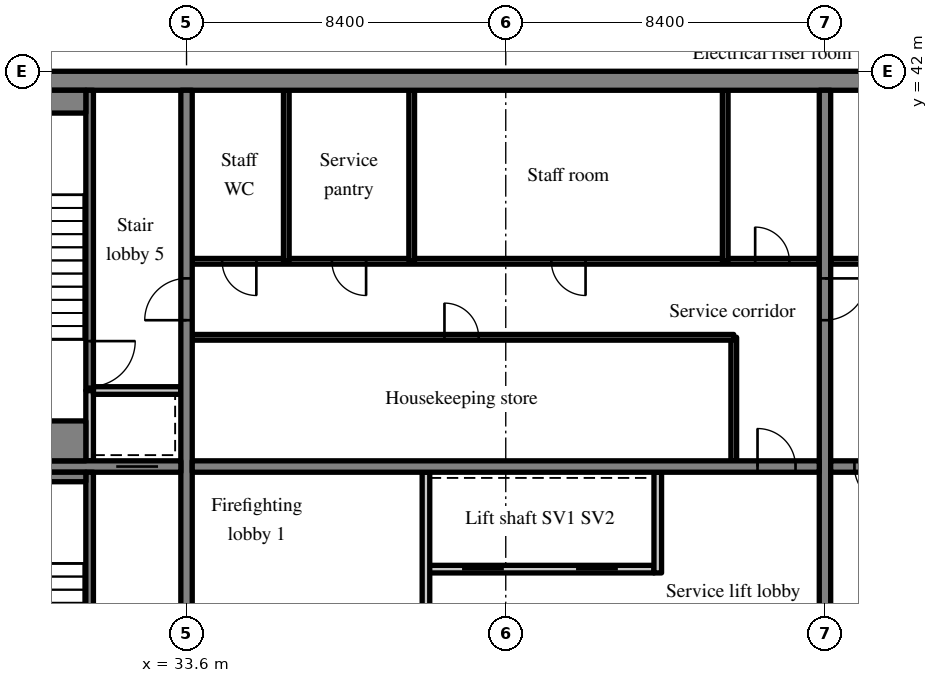
"""IFC4 building model, lengths in metres.
Left out: names, types, materials, properties, quantities, classifications, styles, units other than length and angle.
Written with IfcOpenShell. Run it as: python <this file> out.ifc"""

import sys

from ifc_helpers import new_model, si_unit, direction, frame, frame_2d, origin, place, context, subcontext, project, spatial, rectangle, extrude, source, transform, mapped, element, fill, save


model = new_model("IFC4")
c1 = context("Model", 3, precision=1e-05, world=origin(), true_north=direction((0.0, 1.0)))
c2 = subcontext(c1, "Body", "Model", "MODEL_VIEW")
j1 = project(units=[si_unit("LENGTHUNIT", "METRE"), si_unit("PLANEANGLEUNIT", "RADIAN")], contexts=[c1])
p1 = place(None, origin())
s1 = spatial("IfcSite", under=j1, at=p1, CompositionType="ELEMENT")
p2 = place(p1, origin())
s2 = spatial("IfcBuilding", under=s1, at=p2, CompositionType="ELEMENT")
p3 = place(p2, frame((0.0, 0.0, 281.7)))
s3 = spatial("IfcBuildingStorey", under=s2, at=p3, CompositionType="ELEMENT", Elevation=281.7)
m1 = source(origin(), c2, "Body", "SweptSolid", [
    extrude(rectangle(XDim=50.4, YDim=0.5, at=frame_2d((25.2, 0.0))), origin(), (0.0, 0.0, 1.0), 3.72),
])
p4 = place(p3, frame((25.2, 41.75, 0.0), z_axis=(0.0, 0.0, 1.0), x_axis=(1.0, 0.0, 0.0)))
e1 = element("IfcWall", 1, at=p4, inside=s3, PredefinedType="SHEAR", context=c2, shape_type="MappedRepresentation", body=[
    mapped(m1, transform((0.0, 0.0, 0.0), scale=1.0)),
])
m2 = source(origin(), c2, "Body", "SweptSolid", [
    extrude(rectangle(XDim=19.0, YDim=0.3, at=frame_2d((9.5, 0.0))), origin(), (0.0, 0.0, 1.0), 3.72),
])
p5 = place(p3, frame((33.6, 22.5, 0.0), z_axis=(0.0, 0.0, 1.0), x_axis=(0.0, 1.0, 0.0)))
e2 = element("IfcWall", 2, at=p5, inside=s3, PredefinedType="SHEAR", context=c2, shape_type="MappedRepresentation", body=[
    mapped(m2, transform((0.0, 0.0, 0.0), scale=1.0)),
])
m3 = source(origin(), c2, "Body", "SweptSolid", [
    extrude(rectangle(XDim=1.1, YDim=2.1, at=frame_2d((0.55, 1.05))), frame((0.0, 0.16, 0.0), z_axis=(0.0, -1.0, 0.0), x_axis=(1.0, 0.0, 0.0)), (0.0, 0.0, 1.0), 0.32),
])
p6 = place(p5, frame((12.95, 0.0, 0.0)))
e3 = element("IfcOpeningElement", 3, at=p6, cuts=e2, PredefinedType="OPENING", context=c2, shape_type="MappedRepresentation", body=[
    mapped(m3, transform((0.0, 0.0, 0.0), scale=1.0)),
])
p7 = place(p3, frame((50.4, 22.5, 0.0), z_axis=(0.0, 0.0, 1.0), x_axis=(0.0, 1.0, 0.0)))
e4 = element("IfcWall", 4, at=p7, inside=s3, PredefinedType="SHEAR", context=c2, shape_type="MappedRepresentation", body=[
    mapped(m2, transform((0.0, 0.0, 0.0), scale=1.0)),
])
p8 = place(p7, frame((12.95, 0.0, 0.0)))
e5 = element("IfcOpeningElement", 5, at=p8, cuts=e4, PredefinedType="OPENING", context=c2, shape_type="MappedRepresentation", body=[
    mapped(m3, transform((0.0, 0.0, 0.0), scale=1.0)),
])
m4 = source(origin(), c2, "Body", "SweptSolid", [
    extrude(rectangle(XDim=7.75, YDim=0.3, at=frame_2d((3.875, 0.0))), origin(), (0.0, 0.0, 1.0), 3.72),
])
p9 = place(p3, frame((25.7, 31.6, 0.0), z_axis=(0.0, 0.0, 1.0), x_axis=(1.0, 0.0, 0.0)))
e6 = element("IfcWall", 6, at=p9, inside=s3, PredefinedType="SHEAR", context=c2, shape_type="MappedRepresentation", body=[
    mapped(m4, transform((0.0, 0.0, 0.0), scale=1.0)),
])
p10 = place(p9, frame((6.05, 0.0, 0.0)))
e7 = element("IfcOpeningElement", 7, at=p10, cuts=e6, PredefinedType="OPENING", context=c2, shape_type="MappedRepresentation", body=[
    mapped(m3, transform((0.0, 0.0, 0.0), scale=1.0)),
])
m5 = source(origin(), c2, "Body", "SweptSolid", [
    extrude(rectangle(XDim=16.5, YDim=0.3, at=frame_2d((8.25, 0.0))), origin(), (0.0, 0.0, 1.0), 3.72),
])
p11 = place(p3, frame((33.75, 31.6, 0.0), z_axis=(0.0, 0.0, 1.0), x_axis=(1.0, 0.0, 0.0)))
e8 = element("IfcWall", 8, at=p11, inside=s3, PredefinedType="SHEAR", context=c2, shape_type="MappedRepresentation", body=[
    mapped(m5, transform((0.0, 0.0, 0.0), scale=1.0)),
])
m6 = source(origin(), c2, "Body", "SweptSolid", [
    extrude(rectangle(XDim=1.0, YDim=2.1, at=frame_2d((0.5, 1.05))), frame((0.0, 0.16, 0.0), z_axis=(0.0, -1.0, 0.0), x_axis=(1.0, 0.0, 0.0)), (0.0, 0.0, 1.0), 0.32),
])
p12 = place(p11, frame((14.875, 0.0, 0.0)))
e9 = element("IfcOpeningElement", 9, at=p12, cuts=e8, PredefinedType="OPENING", context=c2, shape_type="MappedRepresentation", body=[
    mapped(m6, transform((0.0, 0.0, 0.0), scale=1.0)),
])
p13 = place(p3, frame((50.55, 31.6, 0.0), z_axis=(0.0, 0.0, 1.0), x_axis=(1.0, 0.0, 0.0)))
e10 = element("IfcWall", 10, at=p13, inside=s3, PredefinedType="SHEAR", context=c2, shape_type="MappedRepresentation", body=[
    mapped(m5, transform((0.0, 0.0, 0.0), scale=1.0)),
])
p14 = place(p13, frame((0.625, 0.0, 0.0)))
e11 = element("IfcOpeningElement", 11, at=p14, cuts=e10, PredefinedType="OPENING", context=c2, shape_type="MappedRepresentation", body=[
    mapped(m6, transform((0.0, 0.0, 0.0), scale=1.0)),
])
m7 = source(origin(), c2, "Body", "SweptSolid", [
    extrude(rectangle(XDim=6.0, YDim=0.2, at=frame_2d((3.0, 0.0))), origin(), (0.0, 0.0, 1.0), 3.72),
])
p15 = place(p3, frame((39.9, 28.9, 0.0), z_axis=(0.0, 0.0, 1.0), x_axis=(1.0, 0.0, 0.0)))
e12 = element("IfcWall", 12, at=p15, inside=s3, PredefinedType="SOLIDWALL", context=c2, shape_type="MappedRepresentation", body=[
    mapped(m7, transform((0.0, 0.0, 0.0), scale=1.0)),
])
m8 = source(origin(), c2, "Body", "SweptSolid", [
    extrude(rectangle(XDim=1.1, YDim=2.1, at=frame_2d((0.55, 1.05))), frame((0.0, 0.11, 0.0), z_axis=(0.0, -1.0, 0.0), x_axis=(1.0, 0.0, 0.0)), (0.0, 0.0, 1.0), 0.22),
])
p16 = place(p15, frame((0.95, 0.0, 0.0)))
e13 = element("IfcOpeningElement", 13, at=p16, cuts=e12, PredefinedType="OPENING", context=c2, shape_type="MappedRepresentation", body=[
    mapped(m8, transform((0.0, 0.0, 0.0), scale=1.0)),
])
p17 = place(p15, frame((3.95, 0.0, 0.0)))
e14 = element("IfcOpeningElement", 14, at=p17, cuts=e12, PredefinedType="OPENING", context=c2, shape_type="MappedRepresentation", body=[
    mapped(m8, transform((0.0, 0.0, 0.0), scale=1.0)),
])
m9 = source(origin(), c2, "Body", "SweptSolid", [
    extrude(rectangle(XDim=8.95, YDim=0.2, at=frame_2d((4.475, 0.0))), origin(), (0.0, 0.0, 1.0), 3.72),
])
p18 = place(p3, frame((39.9, 22.5, 0.0), z_axis=(0.0, 0.0, 1.0), x_axis=(0.0, 1.0, 0.0)))
e15 = element("IfcWall", 15, at=p18, inside=s3, PredefinedType="PARTITIONING", context=c2, shape_type="MappedRepresentation", body=[
    mapped(m9, transform((0.0, 0.0, 0.0), scale=1.0)),
])
m10 = source(origin(), c2, "Body", "SweptSolid", [
    extrude(rectangle(XDim=0.9, YDim=2.1, at=frame_2d((0.45, 1.05))), frame((0.0, 0.11, 0.0), z_axis=(0.0, -1.0, 0.0), x_axis=(1.0, 0.0, 0.0)), (0.0, 0.0, 1.0), 0.22),
])
p19 = place(p18, frame((4.05, 0.0, 0.0)))
e16 = element("IfcOpeningElement", 16, at=p19, cuts=e15, PredefinedType="OPENING", context=c2, shape_type="MappedRepresentation", body=[
    mapped(m10, transform((0.0, 0.0, 0.0), scale=1.0)),
])
m11 = source(origin(), c2, "Body", "SweptSolid", [
    extrude(rectangle(XDim=2.65, YDim=0.2, at=frame_2d((1.325, 0.0))), origin(), (0.0, 0.0, 1.0), 3.72),
])
p20 = place(p3, frame((46.0, 28.8, 0.0), z_axis=(0.0, 0.0, 1.0), x_axis=(0.0, 1.0, 0.0)))
e17 = element("IfcWall", 17, at=p20, inside=s3, PredefinedType="SOLIDWALL", context=c2, shape_type="MappedRepresentation", body=[
    mapped(m11, transform((0.0, 0.0, 0.0), scale=1.0)),
])
m12 = source(origin(), c2, "Body", "SweptSolid", [
    extrude(rectangle(XDim=3.25, YDim=0.15, at=frame_2d((1.625, 0.0))), origin(), (0.0, 0.0, 1.0), 3.72),
])
p21 = place(p3, frame((48.0, 31.75, 0.0), z_axis=(0.0, 0.0, 1.0), x_axis=(0.0, 1.0, 0.0)))
e18 = element("IfcWall", 18, at=p21, inside=s3, PredefinedType="PARTITIONING", context=c2, shape_type="MappedRepresentation", body=[
    mapped(m12, transform((0.0, 0.0, 0.0), scale=1.0)),
])
m13 = source(origin(), c2, "Body", "SweptSolid", [
    extrude(rectangle(XDim=14.25, YDim=0.15, at=frame_2d((7.125, 0.0))), origin(), (0.0, 0.0, 1.0), 3.72),
])
p22 = place(p3, frame((33.75, 35.0, 0.0), z_axis=(0.0, 0.0, 1.0), x_axis=(1.0, 0.0, 0.0)))
e19 = element("IfcWall", 19, at=p22, inside=s3, PredefinedType="PARTITIONING", context=c2, shape_type="MappedRepresentation", body=[
    mapped(m13, transform((0.0, 0.0, 0.0), scale=1.0)),
])
m14 = source(origin(), c2, "Body", "SweptSolid", [
    extrude(rectangle(XDim=0.9, YDim=2.1, at=frame_2d((0.45, 1.05))), frame((0.0, 0.085, 0.0), z_axis=(0.0, -1.0, 0.0), x_axis=(1.0, 0.0, 0.0)), (0.0, 0.0, 1.0), 0.17),
])
p23 = place(p22, frame((6.637, 0.0, 0.0)))
e20 = element("IfcOpeningElement", 20, at=p23, cuts=e19, PredefinedType="OPENING", context=c2, shape_type="MappedRepresentation", body=[
    mapped(m14, transform((0.0, 0.0, 0.0), scale=1.0)),
])
m15 = source(origin(), c2, "Body", "SweptSolid", [
    extrude(rectangle(XDim=16.5, YDim=0.15, at=frame_2d((8.25, 0.0))), origin(), (0.0, 0.0, 1.0), 3.72),
])
p24 = place(p3, frame((33.75, 37.0, 0.0), z_axis=(0.0, 0.0, 1.0), x_axis=(1.0, 0.0, 0.0)))
e21 = element("IfcWall", 21, at=p24, inside=s3, PredefinedType="PARTITIONING", context=c2, shape_type="MappedRepresentation", body=[
    mapped(m15, transform((0.0, 0.0, 0.0), scale=1.0)),
])
p25 = place(p24, frame((0.787, 0.0, 0.0)))
e22 = element("IfcOpeningElement", 22, at=p25, cuts=e21, PredefinedType="OPENING", context=c2, shape_type="MappedRepresentation", body=[
    mapped(m14, transform((0.0, 0.0, 0.0), scale=1.0)),
])
p26 = place(p24, frame((3.675, 0.0, 0.0)))
e23 = element("IfcOpeningElement", 23, at=p26, cuts=e21, PredefinedType="OPENING", context=c2, shape_type="MappedRepresentation", body=[
    mapped(m14, transform((0.0, 0.0, 0.0), scale=1.0)),
])
p27 = place(p24, frame((9.45, 0.0, 0.0)))
e24 = element("IfcOpeningElement", 24, at=p27, cuts=e21, PredefinedType="OPENING", context=c2, shape_type="MappedRepresentation", body=[
    mapped(m14, transform((0.0, 0.0, 0.0), scale=1.0)),
])
p28 = place(p24, frame((14.813, 0.0, 0.0)))
e25 = element("IfcOpeningElement", 25, at=p28, cuts=e21, PredefinedType="OPENING", context=c2, shape_type="MappedRepresentation", body=[
    mapped(m14, transform((0.0, 0.0, 0.0), scale=1.0)),
])
m16 = source(origin(), c2, "Body", "SweptSolid", [
    extrude(rectangle(XDim=4.5, YDim=0.15, at=frame_2d((2.25, 0.0))), origin(), (0.0, 0.0, 1.0), 3.72),
])
for number, where, z_axis, x_axis in (
    (26, (36.225, 37.0, 0.0), (0.0, 0.0, 1.0), (0.0, 1.0, 0.0)),
    (27, (39.525, 37.0, 0.0), (0.0, 0.0, 1.0), (0.0, 1.0, 0.0)),
    (28, (47.775, 37.0, 0.0), (0.0, 0.0, 1.0), (0.0, 1.0, 0.0)),
):
    element("IfcWall", number, at=place(p3, frame(where, z_axis=z_axis, x_axis=x_axis)), inside=s3, PredefinedType="PARTITIONING", context=c2, shape_type="MappedRepresentation", body=[
        mapped(m16, transform((0.0, 0.0, 0.0), scale=1.0)),
    ])
p29 = place(p3, frame((67.05, 37.0, 0.0), z_axis=(0.0, 0.0, 1.0), x_axis=(-1.0, 0.0, 0.0)))
e29 = element("IfcWall", 29, at=p29, inside=s3, PredefinedType="PARTITIONING", context=c2, shape_type="MappedRepresentation", body=[
    mapped(m15, transform((0.0, 0.0, 0.0), scale=1.0)),
])
p30 = place(p29, frame((6.563, 0.0, 0.0)))
e30 = element("IfcOpeningElement", 30, at=p30, cuts=e29, PredefinedType="OPENING", context=c2, shape_type="MappedRepresentation", body=[
    mapped(m14, transform((0.0, 0.0, 0.0), scale=1.0)),
])
p31 = place(p29, frame((14.813, 0.0, 0.0)))
e31 = element("IfcOpeningElement", 31, at=p31, cuts=e29, PredefinedType="OPENING", context=c2, shape_type="MappedRepresentation", body=[
    mapped(m14, transform((0.0, 0.0, 0.0), scale=1.0)),
])
m17 = source(origin(), c2, "Body", "SweptSolid", [
    extrude(rectangle(XDim=8.95, YDim=0.2, at=frame_2d((4.475, 0.0))), origin(), (0.0, 0.0, 1.0), 3.72),
])
p32 = place(p3, frame((31.05, 22.5, 0.0), z_axis=(0.0, 0.0, 1.0), x_axis=(0.0, 1.0, 0.0)))
e32 = element("IfcWall", 32, at=p32, inside=s3, PredefinedType="SOLIDWALL", context=c2, shape_type="MappedRepresentation", body=[
    mapped(m17, transform((0.0, 0.0, 0.0), scale=1.0)),
])
m18 = source(origin(), c2, "Body", "SweptSolid", [
    extrude(rectangle(XDim=1.2, YDim=2.1, at=frame_2d((0.6, 1.05))), frame((0.0, 0.11, 0.0), z_axis=(0.0, -1.0, 0.0), x_axis=(1.0, 0.0, 0.0)), (0.0, 0.0, 1.0), 0.22),
])
p33 = place(p32, frame((1.1, 0.0, 0.0)))
e33 = element("IfcOpeningElement", 33, at=p33, cuts=e32, PredefinedType="OPENING", context=c2, shape_type="MappedRepresentation", body=[
    mapped(m18, transform((0.0, 0.0, 0.0), scale=1.0)),
])
m19 = source(origin(), c2, "Body", "SweptSolid", [
    extrude(rectangle(XDim=1.85, YDim=0.2, at=frame_2d((0.925, 0.0))), origin(), (0.0, 0.0, 1.0), 3.72),
])
p34 = place(p3, frame((31.05, 31.75, 0.0), z_axis=(0.0, 0.0, 1.0), x_axis=(0.0, 1.0, 0.0)))
e34 = element("IfcWall", 34, at=p34, inside=s3, PredefinedType="SOLIDWALL", context=c2, shape_type="MappedRepresentation", body=[
    mapped(m19, transform((0.0, 0.0, 0.0), scale=1.0)),
])
m20 = source(origin(), c2, "Body", "SweptSolid", [
    extrude(rectangle(XDim=2.3, YDim=0.2, at=frame_2d((1.15, 0.0))), origin(), (0.0, 0.0, 1.0), 3.72),
])
p35 = place(p3, frame((31.15, 33.6, 0.0), z_axis=(0.0, 0.0, 1.0), x_axis=(1.0, 0.0, 0.0)))
e35 = element("IfcWall", 35, at=p35, inside=s3, PredefinedType="SOLIDWALL", context=c2, shape_type="MappedRepresentation", body=[
    mapped(m20, transform((0.0, 0.0, 0.0), scale=1.0)),
])
m21 = source(origin(), c2, "Body", "SweptSolid", [
    extrude(rectangle(XDim=7.9, YDim=0.2, at=frame_2d((3.95, 0.0))), origin(), (0.0, 0.0, 1.0), 3.72),
])
p36 = place(p3, frame((31.05, 33.6, 0.0), z_axis=(0.0, 0.0, 1.0), x_axis=(0.0, 1.0, 0.0)))
e36 = element("IfcWall", 36, at=p36, inside=s3, PredefinedType="SOLIDWALL", context=c2, shape_type="MappedRepresentation", body=[
    mapped(m21, transform((0.0, 0.0, 0.0), scale=1.0)),
])
p37 = place(p36, frame((0.1, 0.0, 0.0)))
e37 = element("IfcOpeningElement", 37, at=p37, cuts=e36, PredefinedType="OPENING", context=c2, shape_type="MappedRepresentation", body=[
    mapped(m18, transform((0.0, 0.0, 0.0), scale=1.0)),
])
m22 = source(origin(), c2, "Body", "SweptSolid", [
    extrude(rectangle(XDim=5.25, YDim=0.25, at=frame_2d((2.625, 0.0))), origin(), (0.0, 0.0, 1.0), 3.72),
])
p38 = place(p3, frame((25.7, 31.325, 0.0), z_axis=(0.0, 0.0, 1.0), x_axis=(1.0, 0.0, 0.0)))
e38 = element("IfcWall", 38, at=p38, inside=s3, PredefinedType="SOLIDWALL", context=c2, shape_type="MappedRepresentation", body=[
    mapped(m22, transform((0.0, 0.0, 0.0), scale=1.0)),
])
m23 = source(origin(), c2, "Body", "SweptSolid", [
    extrude(rectangle(XDim=5.25, YDim=0.6, at=frame_2d((2.625, 0.0))), origin(), (0.0, 0.0, 1.0), 3.72),
])
p39 = place(p3, frame((25.7, 41.2, 0.0), z_axis=(0.0, 0.0, 1.0), x_axis=(1.0, 0.0, 0.0)))
e39 = element("IfcWall", 39, at=p39, inside=s3, PredefinedType="SOLIDWALL", context=c2, shape_type="MappedRepresentation", body=[
    mapped(m23, transform((0.0, 0.0, 0.0), scale=1.0)),
])
m24 = source(origin(), c2, "Body", "SweptSolid", [
    extrude(rectangle(XDim=5.25, YDim=1.05, at=frame_2d((2.625, 0.0))), origin(), (0.0, 0.0, 1.0), 3.72),
])
p40 = place(p3, frame((25.7, 32.275, 0.0), z_axis=(0.0, 0.0, 1.0), x_axis=(1.0, 0.0, 0.0)))
e40 = element("IfcWall", 40, at=p40, inside=s3, PredefinedType="SOLIDWALL", context=c2, shape_type="MappedRepresentation", body=[
    mapped(m24, transform((0.0, 0.0, 0.0), scale=1.0)),
])
m25 = source(origin(), c2, "Body", "SweptSolid", [
    extrude(rectangle(XDim=1.0, YDim=2.1, at=frame_2d((0.5, 1.05))), frame((0.0, 0.025, 0.0), z_axis=(0.0, -1.0, 0.0), x_axis=(1.0, 0.0, 0.0)), (0.0, 0.0, 1.0), 0.05),
])
p41 = place(p12, origin())
e41 = element("IfcDoor", 41, at=p41, inside=s3, OperationType="SINGLE_SWING_LEFT", PredefinedType="DOOR", context=c2, shape_type="MappedRepresentation", body=[
    mapped(m25, transform((0.0, 0.0, 0.0), scale=1.0)),
])
fill(e9, e41)
m26 = source(origin(), c2, "Body", "SweptSolid", [
    extrude(rectangle(XDim=1.1, YDim=2.1, at=frame_2d((0.55, 1.05))), frame((0.0, 0.025, 0.0), z_axis=(0.0, -1.0, 0.0), x_axis=(1.0, 0.0, 0.0)), (0.0, 0.0, 1.0), 0.05),
])
p42 = place(p16, origin())
e42 = element("IfcDoor", 42, at=p42, inside=s3, OperationType="SLIDING_TO_LEFT", PredefinedType="DOOR", context=c2, shape_type="MappedRepresentation", body=[
    mapped(m26, transform((0.0, 0.0, 0.0), scale=1.0)),
])
fill(e13, e42)
p43 = place(p17, origin())
e43 = element("IfcDoor", 43, at=p43, inside=s3, OperationType="SLIDING_TO_RIGHT", PredefinedType="DOOR", context=c2, shape_type="MappedRepresentation", body=[
    mapped(m26, transform((0.0, 0.0, 0.0), scale=1.0)),
])
fill(e14, e43)
m27 = source(origin(), c2, "Body", "SweptSolid", [
    extrude(rectangle(XDim=0.9, YDim=2.1, at=frame_2d((0.45, 1.05))), frame((0.0, 0.025, 0.0), z_axis=(0.0, -1.0, 0.0), x_axis=(1.0, 0.0, 0.0)), (0.0, 0.0, 1.0), 0.05),
])
p44 = place(p23, origin())
e44 = element("IfcDoor", 44, at=p44, inside=s3, OperationType="SINGLE_SWING_LEFT", PredefinedType="DOOR", context=c2, shape_type="MappedRepresentation", body=[
    mapped(m27, transform((0.0, 0.0, 0.0), scale=1.0)),
])
fill(e20, e44)
p45 = place(p25, origin())
e45 = element("IfcDoor", 45, at=p45, inside=s3, OperationType="SINGLE_SWING_RIGHT", PredefinedType="DOOR", context=c2, shape_type="MappedRepresentation", body=[
    mapped(m27, transform((0.0, 0.0, 0.0), scale=1.0)),
])
fill(e22, e45)
p46 = place(p26, origin())
e46 = element("IfcDoor", 46, at=p46, inside=s3, OperationType="SINGLE_SWING_RIGHT", PredefinedType="DOOR", context=c2, shape_type="MappedRepresentation", body=[
    mapped(m27, transform((0.0, 0.0, 0.0), scale=1.0)),
])
fill(e23, e46)
p47 = place(p27, origin())
e47 = element("IfcDoor", 47, at=p47, inside=s3, OperationType="SINGLE_SWING_RIGHT", PredefinedType="DOOR", context=c2, shape_type="MappedRepresentation", body=[
    mapped(m27, transform((0.0, 0.0, 0.0), scale=1.0)),
])
fill(e24, e47)
p48 = place(p28, origin())
e48 = element("IfcDoor", 48, at=p48, inside=s3, OperationType="SINGLE_SWING_LEFT", PredefinedType="DOOR", context=c2, shape_type="MappedRepresentation", body=[
    mapped(m27, transform((0.0, 0.0, 0.0), scale=1.0)),
])
fill(e25, e48)
p49 = place(p14, origin())
e49 = element("IfcDoor", 49, at=p49, inside=s3, OperationType="SINGLE_SWING_RIGHT", PredefinedType="DOOR", context=c2, shape_type="MappedRepresentation", body=[
    mapped(m25, transform((0.0, 0.0, 0.0), scale=1.0)),
])
fill(e11, e49)
p50 = place(p10, origin())
e50 = element("IfcDoor", 50, at=p50, inside=s3, OperationType="SLIDING_TO_RIGHT", PredefinedType="DOOR", context=c2, shape_type="MappedRepresentation", body=[
    mapped(m26, transform((0.0, 0.0, 0.0), scale=1.0)),
])
fill(e7, e50)
m28 = source(origin(), c2, "Body", "SweptSolid", [
    extrude(rectangle(XDim=1.2, YDim=2.1, at=frame_2d((0.6, 1.05))), frame((0.0, 0.025, 0.0), z_axis=(0.0, -1.0, 0.0), x_axis=(1.0, 0.0, 0.0)), (0.0, 0.0, 1.0), 0.05),
])
p51 = place(p37, origin())
e51 = element("IfcDoor", 51, at=p51, inside=s3, OperationType="SINGLE_SWING_RIGHT", PredefinedType="DOOR", context=c2, shape_type="MappedRepresentation", body=[
    mapped(m28, transform((0.0, 0.0, 0.0), scale=1.0)),
])
fill(e37, e51)
p52 = place(p6, origin())
e52 = element("IfcDoor", 52, at=p52, inside=s3, OperationType="SINGLE_SWING_LEFT", PredefinedType="DOOR", context=c2, shape_type="MappedRepresentation", body=[
    mapped(m26, transform((0.0, 0.0, 0.0), scale=1.0)),
])
fill(e3, e52)
p53 = place(p8, origin())
e53 = element("IfcDoor", 53, at=p53, inside=s3, OperationType="SINGLE_SWING_RIGHT", PredefinedType="DOOR", context=c2, shape_type="MappedRepresentation", body=[
    mapped(m26, transform((0.0, 0.0, 0.0), scale=1.0)),
])
fill(e5, e53)
save(model, sys.argv[1])
